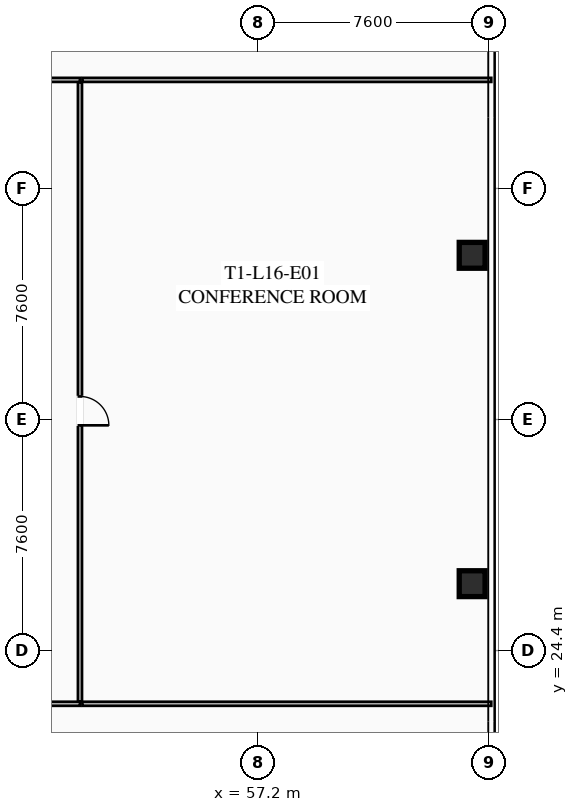
"""IFC4 building model, lengths in metres.
Left out: names, types, materials, properties, quantities, classifications, styles, units other than length and angle.
Written with IfcOpenShell. Run it as: python <this file> out.ifc"""

import sys

from ifc_helpers import new_model, si_unit, direction, frame, frame_2d, origin, origin_2d, place, context, subcontext, project, spatial, rectangle, hollow_rectangle, extrude, element, fill, save


model = new_model("IFC4")
c1 = context("Model", 3, precision=1e-05, world=origin(), true_north=direction((0.0, 1.0)))
c2 = subcontext(c1, "Body", "Model", "MODEL_VIEW")
j1 = project(units=[si_unit("LENGTHUNIT", "METRE"), si_unit("PLANEANGLEUNIT", "RADIAN")], contexts=[c1])
p1 = place(None, origin())
s1 = spatial("IfcSite", under=j1, at=p1, CompositionType="ELEMENT")
p2 = place(p1, origin())
s2 = spatial("IfcBuilding", under=s1, at=p2, CompositionType="ELEMENT")
p3 = place(p2, frame((0.0, 0.0, 63.65)))
s3 = spatial("IfcBuildingStorey", under=s2, at=p3, CompositionType="ELEMENT", Elevation=63.65)
for number, where, z_axis, x_axis in (
    (1, (64.25, 26.6, 0.0), (0.0, 0.0, 1.0), (1.0, 0.0, 0.0)),
    (2, (64.25, 37.4, 0.0), (0.0, 0.0, 1.0), (1.0, 0.0, 0.0)),
):
    element("IfcColumn", number, at=place(p3, frame(where, z_axis=z_axis, x_axis=x_axis)), inside=s3, PredefinedType="COLUMN", context=c2, shape_type="SweptSolid", body=[
        extrude(hollow_rectangle(XDim=0.85, YDim=0.85, WallThickness=0.035, at=origin_2d()), origin(), (0.0, 0.0, 1.0), 3.35),
    ])
p4 = place(p3, frame((22.35, 43.17, 0.0), z_axis=(0.0, 0.0, 1.0), x_axis=(1.0, 0.0, 0.0)))
e3 = element("IfcWall", 3, at=p4, inside=s3, PredefinedType="PARTITIONING", context=c2, shape_type="SweptSolid", body=[
    extrude(rectangle(XDim=29.0, YDim=0.135, at=frame_2d((14.5, 0.0))), origin(), (0.0, 0.0, 1.0), 2.493),
])
p5 = place(p4, frame((0.3, 0.0, 0.0)))
e4 = element("IfcOpeningElement", 4, at=p5, cuts=e3, PredefinedType="OPENING", context=c2, shape_type="SweptSolid", body=[
    extrude(rectangle(XDim=0.95, YDim=2.05, at=frame_2d((0.475, 1.025))), frame((0.0, 0.077, 0.0), z_axis=(0.0, -1.0, 0.0), x_axis=(1.0, 0.0, 0.0)), (0.0, 0.0, 1.0), 0.155),
])
p6 = place(p4, frame((19.481, 0.0, 0.0)))
e5 = element("IfcOpeningElement", 5, at=p6, cuts=e3, PredefinedType="OPENING", context=c2, shape_type="SweptSolid", body=[
    extrude(rectangle(XDim=0.95, YDim=2.05, at=frame_2d((0.475, 1.025))), frame((0.0, 0.077, 0.0), z_axis=(0.0, -1.0, 0.0), x_axis=(1.0, 0.0, 0.0)), (0.0, 0.0, 1.0), 0.155),
])
p7 = place(p3, frame((51.35, 22.65, 0.0), z_axis=(0.0, 0.0, 1.0), x_axis=(-1.0, 0.0, 0.0)))
e6 = element("IfcWall", 6, at=p7, inside=s3, PredefinedType="PARTITIONING", context=c2, shape_type="SweptSolid", body=[
    extrude(rectangle(XDim=29.0, YDim=0.135, at=frame_2d((14.5, 0.0))), origin(), (0.0, 0.0, 1.0), 2.493),
])
p8 = place(p7, frame((27.67, 0.0, 0.0)))
e7 = element("IfcOpeningElement", 7, at=p8, cuts=e6, PredefinedType="OPENING", context=c2, shape_type="SweptSolid", body=[
    extrude(rectangle(XDim=0.95, YDim=2.05, at=frame_2d((0.475, 1.025))), frame((0.0, 0.077, 0.0), z_axis=(0.0, -1.0, 0.0), x_axis=(1.0, 0.0, 0.0)), (0.0, 0.0, 1.0), 0.155),
])
p9 = place(p3, frame((51.35, 43.09, 0.0), z_axis=(0.0, 0.0, 1.0), x_axis=(0.0, -1.0, 0.0)))
e8 = element("IfcWall", 8, at=p9, inside=s3, PredefinedType="PARTITIONING", context=c2, shape_type="SweptSolid", body=[
    extrude(rectangle(XDim=20.36, YDim=0.135, at=frame_2d((10.18, 0.0))), origin(), (0.0, 0.0, 1.0), 2.493),
])
p10 = place(p9, frame((10.332, 0.0, 0.0)))
e9 = element("IfcOpeningElement", 9, at=p10, cuts=e8, PredefinedType="OPENING", context=c2, shape_type="SweptSolid", body=[
    extrude(rectangle(XDim=0.95, YDim=2.05, at=frame_2d((0.475, 1.025))), frame((0.0, 0.077, 0.0), z_axis=(0.0, -1.0, 0.0), x_axis=(1.0, 0.0, 0.0)), (0.0, 0.0, 1.0), 0.155),
])
for number, where, z_axis, x_axis in (
    (10, (64.88, 43.17, 0.0), (0.0, 0.0, 1.0), (-1.0, 0.0, 0.0)),
    (11, (51.43, 22.65, 0.0), (0.0, 0.0, 1.0), (1.0, 0.0, 0.0)),
):
    element("IfcWall", number, at=place(p3, frame(where, z_axis=z_axis, x_axis=x_axis)), inside=s3, PredefinedType="PARTITIONING", context=c2, shape_type="SweptSolid", body=[
        extrude(rectangle(XDim=13.45, YDim=0.135, at=frame_2d((6.725, 0.0))), origin(), (0.0, 0.0, 1.0), 2.493),
    ])
p11 = place(p10, origin())
e12 = element("IfcDoor", 12, at=p11, inside=s3, OperationType="SINGLE_SWING_RIGHT", PredefinedType="DOOR", context=c2, shape_type="SweptSolid", body=[
    extrude(rectangle(XDim=0.95, YDim=2.05, at=frame_2d((0.475, 1.025))), frame((0.0, 0.025, 0.0), z_axis=(0.0, -1.0, 0.0), x_axis=(1.0, 0.0, 0.0)), (0.0, 0.0, 1.0), 0.05),
])
fill(e9, e12)
save(model, sys.argv[1])
